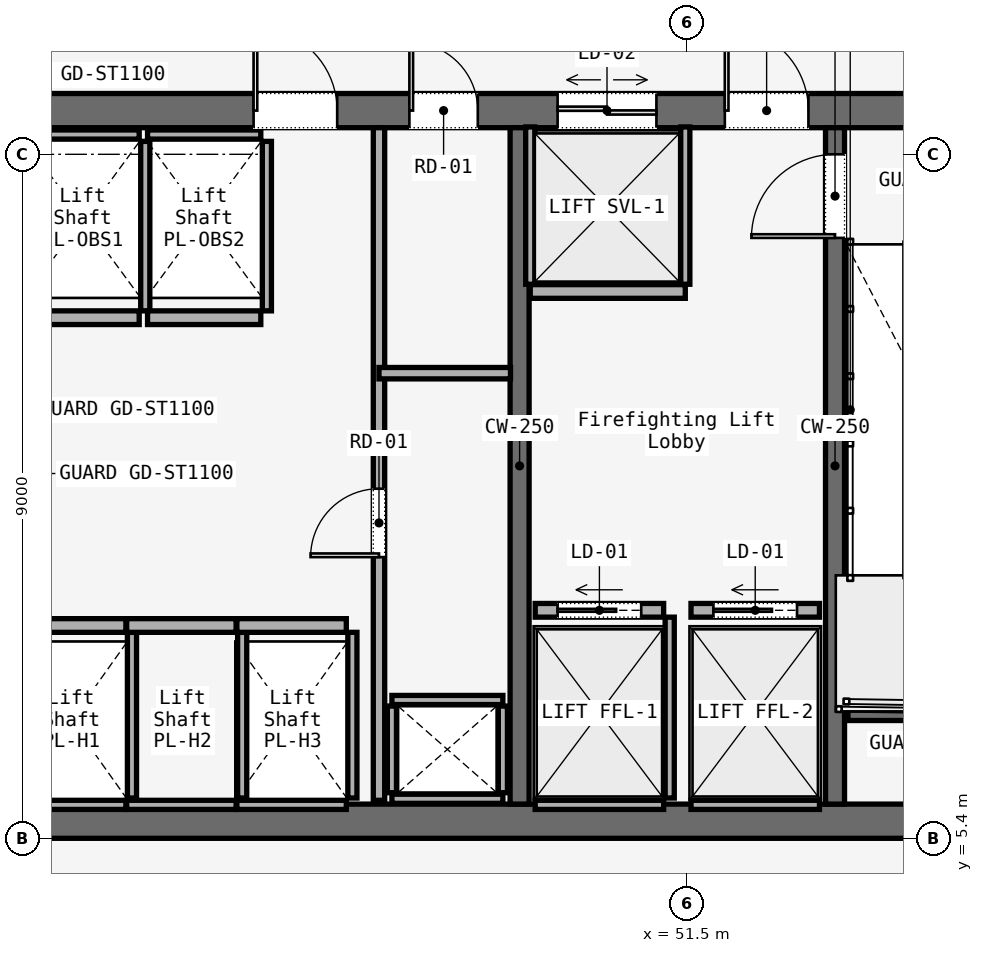
"""IFC4 building model, lengths in metres.
Left out: names, types, materials, properties, quantities, classifications, styles, units other than length and angle.
Written with IfcOpenShell. Run it as: python <this file> out.ifc"""

import sys

from ifc_helpers import new_model, si_unit, direction, frame, frame_2d, origin, place, context, subcontext, project, spatial, rectangle, extrude, element, fill, save


model = new_model("IFC4")
c1 = context("Model", 3, precision=1e-05, world=origin(), true_north=direction((0.0, 1.0)))
c2 = subcontext(c1, "Body", "Model", "MODEL_VIEW")
j1 = project(units=[si_unit("LENGTHUNIT", "METRE"), si_unit("PLANEANGLEUNIT", "RADIAN")], contexts=[c1])
p1 = place(None, origin())
s1 = spatial("IfcSite", under=j1, at=p1, CompositionType="ELEMENT")
p2 = place(p1, origin())
s2 = spatial("IfcBuilding", under=s1, at=p2, CompositionType="ELEMENT")
p3 = place(p2, frame((0.0, 0.0, 24.0)))
s3 = spatial("IfcBuildingStorey", under=s2, at=p3, CompositionType="ELEMENT", Elevation=24.0)
p4 = place(p3, frame((26.45, 14.975, 0.0), z_axis=(0.0, 0.0, 1.0), x_axis=(1.0, 0.0, 0.0)))
e1 = element("IfcWall", 1, at=p4, inside=s3, PredefinedType="SOLIDWALL", context=c2, shape_type="SweptSolid", body=[
    extrude(rectangle(XDim=31.1, YDim=0.45, at=frame_2d((15.55, 0.0))), origin(), (0.0, 0.0, 1.0), 5.55),
])
p5 = place(p4, frame((1.65, 0.0, 0.0)))
e2 = element("IfcOpeningElement", 2, at=p5, cuts=e1, PredefinedType="OPENING", context=c2, shape_type="SweptSolid", body=[
    extrude(rectangle(XDim=1.1, YDim=2.2, at=frame_2d((0.55, 1.1))), frame((0.0, 0.225, 0.0), z_axis=(0.0, -1.0, 0.0), x_axis=(1.0, 0.0, 0.0)), (0.0, 0.0, 1.0), 0.45),
])
p6 = place(p4, frame((13.65, 0.0, 0.0)))
e3 = element("IfcOpeningElement", 3, at=p6, cuts=e1, PredefinedType="OPENING", context=c2, shape_type="SweptSolid", body=[
    extrude(rectangle(XDim=1.1, YDim=2.2, at=frame_2d((0.55, 1.1))), frame((0.0, 0.225, 0.0), z_axis=(0.0, -1.0, 0.0), x_axis=(1.0, 0.0, 0.0)), (0.0, 0.0, 1.0), 0.45),
])
p7 = place(p4, frame((25.55, 0.0, 0.0)))
e4 = element("IfcOpeningElement", 4, at=p7, cuts=e1, PredefinedType="OPENING", context=c2, shape_type="SweptSolid", body=[
    extrude(rectangle(XDim=1.1, YDim=2.2, at=frame_2d((0.55, 1.1))), frame((0.0, 0.225, 0.0), z_axis=(0.0, -1.0, 0.0), x_axis=(1.0, 0.0, 0.0)), (0.0, 0.0, 1.0), 0.45),
])
p8 = place(p4, frame((10.7, 0.0, 0.0)))
e5 = element("IfcOpeningElement", 5, at=p8, cuts=e1, PredefinedType="OPENING", context=c2, shape_type="SweptSolid", body=[
    extrude(rectangle(XDim=1.4, YDim=2.2, at=frame_2d((0.7, 1.1))), frame((0.0, 0.225, 0.0), z_axis=(0.0, -1.0, 0.0), x_axis=(1.0, 0.0, 0.0)), (0.0, 0.0, 1.0), 0.45),
])
p9 = place(p4, frame((19.35, 0.0, 0.0)))
e6 = element("IfcOpeningElement", 6, at=p9, cuts=e1, PredefinedType="OPENING", context=c2, shape_type="SweptSolid", body=[
    extrude(rectangle(XDim=1.1, YDim=2.2, at=frame_2d((0.55, 1.1))), frame((0.0, 0.225, 0.0), z_axis=(0.0, -1.0, 0.0), x_axis=(1.0, 0.0, 0.0)), (0.0, 0.0, 1.0), 0.45),
])
p10 = place(p4, frame((21.4, 0.0, 0.0)))
e7 = element("IfcOpeningElement", 7, at=p10, cuts=e1, PredefinedType="OPENING", context=c2, shape_type="SweptSolid", body=[
    extrude(rectangle(XDim=0.9, YDim=2.1, at=frame_2d((0.45, 1.05))), frame((0.0, 0.225, 0.0), z_axis=(0.0, -1.0, 0.0), x_axis=(1.0, 0.0, 0.0)), (0.0, 0.0, 1.0), 0.45),
])
p11 = place(p4, frame((23.35, 0.0, 0.0)))
e8 = element("IfcOpeningElement", 8, at=p11, cuts=e1, PredefinedType="OPENING", context=c2, shape_type="SweptSolid", body=[
    extrude(rectangle(XDim=1.3, YDim=2.3, at=frame_2d((0.65, 1.15))), frame((0.0, 0.225, 0.0), z_axis=(0.0, -1.0, 0.0), x_axis=(1.0, 0.0, 0.0)), (0.0, 0.0, 1.0), 0.45),
])
p12 = place(p3, frame((26.45, 5.625, 0.0), z_axis=(0.0, 0.0, 1.0), x_axis=(1.0, 0.0, 0.0)))
e9 = element("IfcWall", 9, at=p12, inside=s3, PredefinedType="SOLIDWALL", context=c2, shape_type="SweptSolid", body=[
    extrude(rectangle(XDim=31.1, YDim=0.45, at=frame_2d((15.55, 0.0))), origin(), (0.0, 0.0, 1.0), 5.55),
])
p13 = place(p3, frame((49.3, 5.85, 0.0), z_axis=(0.0, 0.0, 1.0), x_axis=(0.0, 1.0, 0.0)))
e10 = element("IfcWall", 10, at=p13, inside=s3, PredefinedType="SOLIDWALL", context=c2, shape_type="SweptSolid", body=[
    extrude(rectangle(XDim=8.9, YDim=0.25, at=frame_2d((4.45, 0.0))), origin(), (0.0, 0.0, 1.0), 5.55),
])
p14 = place(p3, frame((53.45, 5.85, 0.0), z_axis=(0.0, 0.0, 1.0), x_axis=(0.0, 1.0, 0.0)))
e11 = element("IfcWall", 11, at=p14, inside=s3, PredefinedType="SOLIDWALL", context=c2, shape_type="SweptSolid", body=[
    extrude(rectangle(XDim=8.9, YDim=0.25, at=frame_2d((4.45, 0.0))), origin(), (0.0, 0.0, 1.0), 5.55),
])
p15 = place(p14, frame((7.45, 0.0, 0.0)))
e12 = element("IfcOpeningElement", 12, at=p15, cuts=e11, PredefinedType="OPENING", context=c2, shape_type="SweptSolid", body=[
    extrude(rectangle(XDim=1.1, YDim=2.2, at=frame_2d((0.55, 1.1))), frame((0.0, 0.125, 0.0), z_axis=(0.0, -1.0, 0.0), x_axis=(1.0, 0.0, 0.0)), (0.0, 0.0, 1.0), 0.25),
])
p16 = place(p3, frame((53.62, 7.05, 0.0), z_axis=(0.0, 0.0, 1.0), x_axis=(1.0, 0.0, 0.0)))
e13 = element("IfcWall", 13, at=p16, inside=s3, PredefinedType="SOLIDWALL", context=c2, shape_type="SweptSolid", body=[
    extrude(rectangle(XDim=3.115, YDim=0.2, at=frame_2d((1.558, 0.0))), origin(), (0.0, 0.0, 1.0), 6.0),
])
for number, where, z_axis, x_axis in (
    (14, (47.62, 5.92, 0.0), (0.0, 0.0, 1.0), (1.0, 0.0, 0.0)),
    (15, (47.62, 7.22, 0.0), (0.0, 0.0, 1.0), (1.0, 0.0, 0.0)),
):
    element("IfcWall", number, at=place(p3, frame(where, z_axis=z_axis, x_axis=x_axis)), inside=s3, PredefinedType="SOLIDWALL", context=c2, shape_type="SweptSolid", body=[
        extrude(rectangle(XDim=1.46, YDim=0.12, at=frame_2d((0.73, 0.0))), origin(), (0.0, 0.0, 1.0), 4.17),
    ])
for number, where, z_axis, x_axis in (
    (16, (47.62, 6.0, 0.0), (0.0, 0.0, 1.0), (0.0, 1.0, 0.0)),
    (17, (49.08, 6.0, 0.0), (0.0, 0.0, 1.0), (0.0, 1.0, 0.0)),
):
    element("IfcWall", number, at=place(p3, frame(where, z_axis=z_axis, x_axis=x_axis)), inside=s3, PredefinedType="SOLIDWALL", context=c2, shape_type="SweptSolid", body=[
        extrude(rectangle(XDim=1.14, YDim=0.12, at=frame_2d((0.57, 0.0))), origin(), (0.0, 0.0, 1.0), 4.17),
    ])
p17 = place(p3, frame((47.45, 5.9, 0.0), z_axis=(0.0, 0.0, 1.0), x_axis=(0.0, 1.0, 0.0)))
e18 = element("IfcWall", 18, at=p17, inside=s3, PredefinedType="PARTITIONING", context=c2, shape_type="SweptSolid", body=[
    extrude(rectangle(XDim=8.85, YDim=0.15, at=frame_2d((4.425, 0.0))), origin(), (0.0, 0.0, 1.0), 4.17),
])
p18 = place(p17, frame((3.2, 0.0, 0.0)))
e19 = element("IfcOpeningElement", 19, at=p18, cuts=e18, PredefinedType="OPENING", context=c2, shape_type="SweptSolid", body=[
    extrude(rectangle(XDim=0.9, YDim=2.1, at=frame_2d((0.45, 1.05))), frame((0.0, 0.075, 0.0), z_axis=(0.0, -1.0, 0.0), x_axis=(1.0, 0.0, 0.0)), (0.0, 0.0, 1.0), 0.15),
])
p19 = place(p3, frame((47.45, 11.52, 0.0), z_axis=(0.0, 0.0, 1.0), x_axis=(1.0, 0.0, 0.0)))
e20 = element("IfcWall", 20, at=p19, inside=s3, PredefinedType="PARTITIONING", context=c2, shape_type="SweptSolid", body=[
    extrude(rectangle(XDim=1.73, YDim=0.15, at=frame_2d((0.865, 0.0))), origin(), (0.0, 0.0, 1.0), 4.17),
])
p20 = place(p3, frame((42.78, 8.2, 0.0), z_axis=(0.0, 0.0, 1.0), x_axis=(1.0, 0.0, 0.0)))
e21 = element("IfcWall", 21, at=p20, inside=s3, PredefinedType="SOLIDWALL", context=c2, shape_type="SweptSolid", body=[
    extrude(rectangle(XDim=1.34, YDim=0.18, at=frame_2d((0.67, 0.0))), origin(), (0.0, 0.0, 1.0), 4.17),
])
p21 = place(p3, frame((42.78, 5.84, 0.0), z_axis=(0.0, 0.0, 1.0), x_axis=(1.0, 0.0, 0.0)))
e22 = element("IfcWall", 22, at=p21, inside=s3, PredefinedType="SOLIDWALL", context=c2, shape_type="SweptSolid", body=[
    extrude(rectangle(XDim=1.34, YDim=0.12, at=frame_2d((0.67, 0.0))), origin(), (0.0, 0.0, 1.0), 4.17),
])
p22 = place(p3, frame((44.2, 5.93, 0.0), z_axis=(0.0, 0.0, 1.0), x_axis=(0.0, 1.0, 0.0)))
e23 = element("IfcWall", 23, at=p22, inside=s3, PredefinedType="SOLIDWALL", context=c2, shape_type="SweptSolid", body=[
    extrude(rectangle(XDim=2.18, YDim=0.12, at=frame_2d((1.09, 0.0))), origin(), (0.0, 0.0, 1.0), 4.17),
])
p23 = place(p3, frame((44.13, 8.2, 0.0), z_axis=(0.0, 0.0, 1.0), x_axis=(1.0, 0.0, 0.0)))
e24 = element("IfcWall", 24, at=p23, inside=s3, PredefinedType="SOLIDWALL", context=c2, shape_type="SweptSolid", body=[
    extrude(rectangle(XDim=1.44, YDim=0.18, at=frame_2d((0.72, 0.0))), origin(), (0.0, 0.0, 1.0), 4.17),
])
p24 = place(p3, frame((44.13, 5.84, 0.0), z_axis=(0.0, 0.0, 1.0), x_axis=(1.0, 0.0, 0.0)))
e25 = element("IfcWall", 25, at=p24, inside=s3, PredefinedType="SOLIDWALL", context=c2, shape_type="SweptSolid", body=[
    extrude(rectangle(XDim=1.44, YDim=0.12, at=frame_2d((0.72, 0.0))), origin(), (0.0, 0.0, 1.0), 4.17),
])
p25 = place(p3, frame((45.65, 5.93, 0.0), z_axis=(0.0, 0.0, 1.0), x_axis=(0.0, 1.0, 0.0)))
e26 = element("IfcWall", 26, at=p25, inside=s3, PredefinedType="SOLIDWALL", context=c2, shape_type="SweptSolid", body=[
    extrude(rectangle(XDim=2.18, YDim=0.12, at=frame_2d((1.09, 0.0))), origin(), (0.0, 0.0, 1.0), 4.17),
])
p26 = place(p3, frame((45.58, 8.2, 0.0), z_axis=(0.0, 0.0, 1.0), x_axis=(1.0, 0.0, 0.0)))
e27 = element("IfcWall", 27, at=p26, inside=s3, PredefinedType="SOLIDWALL", context=c2, shape_type="SweptSolid", body=[
    extrude(rectangle(XDim=1.44, YDim=0.18, at=frame_2d((0.72, 0.0))), origin(), (0.0, 0.0, 1.0), 4.17),
])
p27 = place(p3, frame((45.58, 5.84, 0.0), z_axis=(0.0, 0.0, 1.0), x_axis=(1.0, 0.0, 0.0)))
e28 = element("IfcWall", 28, at=p27, inside=s3, PredefinedType="SOLIDWALL", context=c2, shape_type="SweptSolid", body=[
    extrude(rectangle(XDim=1.44, YDim=0.12, at=frame_2d((0.72, 0.0))), origin(), (0.0, 0.0, 1.0), 4.17),
])
p28 = place(p3, frame((47.1, 5.93, 0.0), z_axis=(0.0, 0.0, 1.0), x_axis=(0.0, 1.0, 0.0)))
e29 = element("IfcWall", 29, at=p28, inside=s3, PredefinedType="SOLIDWALL", context=c2, shape_type="SweptSolid", body=[
    extrude(rectangle(XDim=2.18, YDim=0.12, at=frame_2d((1.09, 0.0))), origin(), (0.0, 0.0, 1.0), 4.17),
])
p29 = place(p3, frame((42.805, 12.25, 0.0), z_axis=(0.0, 0.0, 1.0), x_axis=(1.0, 0.0, 0.0)))
e30 = element("IfcWall", 30, at=p29, inside=s3, PredefinedType="SOLIDWALL", context=c2, shape_type="SweptSolid", body=[
    extrude(rectangle(XDim=1.49, YDim=0.18, at=frame_2d((0.745, 0.0))), origin(), (0.0, 0.0, 1.0), 4.17),
])
p30 = place(p3, frame((42.805, 14.66, 0.0), z_axis=(0.0, 0.0, 1.0), x_axis=(1.0, 0.0, 0.0)))
e31 = element("IfcWall", 31, at=p30, inside=s3, PredefinedType="SOLIDWALL", context=c2, shape_type="SweptSolid", body=[
    extrude(rectangle(XDim=1.49, YDim=0.12, at=frame_2d((0.745, 0.0))), origin(), (0.0, 0.0, 1.0), 4.17),
])
p31 = place(p3, frame((44.375, 12.34, 0.0), z_axis=(0.0, 0.0, 1.0), x_axis=(0.0, 1.0, 0.0)))
e32 = element("IfcWall", 32, at=p31, inside=s3, PredefinedType="SOLIDWALL", context=c2, shape_type="SweptSolid", body=[
    extrude(rectangle(XDim=2.23, YDim=0.12, at=frame_2d((1.115, 0.0))), origin(), (0.0, 0.0, 1.0), 4.17),
])
p32 = place(p3, frame((44.405, 12.25, 0.0), z_axis=(0.0, 0.0, 1.0), x_axis=(1.0, 0.0, 0.0)))
e33 = element("IfcWall", 33, at=p32, inside=s3, PredefinedType="SOLIDWALL", context=c2, shape_type="SweptSolid", body=[
    extrude(rectangle(XDim=1.49, YDim=0.18, at=frame_2d((0.745, 0.0))), origin(), (0.0, 0.0, 1.0), 4.17),
])
p33 = place(p3, frame((44.405, 14.66, 0.0), z_axis=(0.0, 0.0, 1.0), x_axis=(1.0, 0.0, 0.0)))
e34 = element("IfcWall", 34, at=p33, inside=s3, PredefinedType="SOLIDWALL", context=c2, shape_type="SweptSolid", body=[
    extrude(rectangle(XDim=1.49, YDim=0.12, at=frame_2d((0.745, 0.0))), origin(), (0.0, 0.0, 1.0), 4.17),
])
p34 = place(p3, frame((45.975, 12.34, 0.0), z_axis=(0.0, 0.0, 1.0), x_axis=(0.0, 1.0, 0.0)))
e35 = element("IfcWall", 35, at=p34, inside=s3, PredefinedType="SOLIDWALL", context=c2, shape_type="SweptSolid", body=[
    extrude(rectangle(XDim=2.23, YDim=0.12, at=frame_2d((1.115, 0.0))), origin(), (0.0, 0.0, 1.0), 4.17),
])
p35 = place(p3, frame((49.505, 8.4, 0.0), z_axis=(0.0, 0.0, 1.0), x_axis=(1.0, 0.0, 0.0)))
e36 = element("IfcWall", 36, at=p35, inside=s3, PredefinedType="SOLIDWALL", context=c2, shape_type="SweptSolid", body=[
    extrude(rectangle(XDim=1.69, YDim=0.18, at=frame_2d((0.845, 0.0))), origin(), (0.0, 0.0, 1.0), 4.17),
])
p36 = place(p35, frame((0.295, 0.0, 0.0)))
e37 = element("IfcOpeningElement", 37, at=p36, cuts=e36, PredefinedType="OPENING", context=c2, shape_type="SweptSolid", body=[
    extrude(rectangle(XDim=1.1, YDim=2.2, at=frame_2d((0.55, 1.1))), frame((0.0, 0.09, 0.0), z_axis=(0.0, -1.0, 0.0), x_axis=(1.0, 0.0, 0.0)), (0.0, 0.0, 1.0), 0.18),
])
p37 = place(p3, frame((49.505, 5.84, 0.0), z_axis=(0.0, 0.0, 1.0), x_axis=(1.0, 0.0, 0.0)))
e38 = element("IfcWall", 38, at=p37, inside=s3, PredefinedType="SOLIDWALL", context=c2, shape_type="SweptSolid", body=[
    extrude(rectangle(XDim=1.69, YDim=0.12, at=frame_2d((0.845, 0.0))), origin(), (0.0, 0.0, 1.0), 4.17),
])
p38 = place(p3, frame((51.275, 5.93, 0.0), z_axis=(0.0, 0.0, 1.0), x_axis=(0.0, 1.0, 0.0)))
e39 = element("IfcWall", 39, at=p38, inside=s3, PredefinedType="SOLIDWALL", context=c2, shape_type="SweptSolid", body=[
    extrude(rectangle(XDim=2.38, YDim=0.12, at=frame_2d((1.19, 0.0))), origin(), (0.0, 0.0, 1.0), 4.17),
])
p39 = place(p3, frame((51.555, 8.4, 0.0), z_axis=(0.0, 0.0, 1.0), x_axis=(1.0, 0.0, 0.0)))
e40 = element("IfcWall", 40, at=p39, inside=s3, PredefinedType="SOLIDWALL", context=c2, shape_type="SweptSolid", body=[
    extrude(rectangle(XDim=1.69, YDim=0.18, at=frame_2d((0.845, 0.0))), origin(), (0.0, 0.0, 1.0), 4.17),
])
p40 = place(p39, frame((0.295, 0.0, 0.0)))
e41 = element("IfcOpeningElement", 41, at=p40, cuts=e40, PredefinedType="OPENING", context=c2, shape_type="SweptSolid", body=[
    extrude(rectangle(XDim=1.1, YDim=2.2, at=frame_2d((0.55, 1.1))), frame((0.0, 0.09, 0.0), z_axis=(0.0, -1.0, 0.0), x_axis=(1.0, 0.0, 0.0)), (0.0, 0.0, 1.0), 0.18),
])
p41 = place(p3, frame((51.555, 5.84, 0.0), z_axis=(0.0, 0.0, 1.0), x_axis=(1.0, 0.0, 0.0)))
e42 = element("IfcWall", 42, at=p41, inside=s3, PredefinedType="SOLIDWALL", context=c2, shape_type="SweptSolid", body=[
    extrude(rectangle(XDim=1.69, YDim=0.12, at=frame_2d((0.845, 0.0))), origin(), (0.0, 0.0, 1.0), 4.17),
])
p42 = place(p3, frame((49.44, 12.595, 0.0), z_axis=(0.0, 0.0, 1.0), x_axis=(1.0, 0.0, 0.0)))
e43 = element("IfcWall", 43, at=p42, inside=s3, PredefinedType="SOLIDWALL", context=c2, shape_type="SweptSolid", body=[
    extrude(rectangle(XDim=2.04, YDim=0.18, at=frame_2d((1.02, 0.0))), origin(), (0.0, 0.0, 1.0), 4.17),
])
for number, where, z_axis, x_axis in (
    (44, (49.44, 12.69, 0.0), (0.0, 0.0, 1.0), (0.0, 1.0, 0.0)),
    (45, (51.48, 12.69, 0.0), (0.0, 0.0, 1.0), (0.0, 1.0, 0.0)),
):
    element("IfcWall", number, at=place(p3, frame(where, z_axis=z_axis, x_axis=x_axis)), inside=s3, PredefinedType="SOLIDWALL", context=c2, shape_type="SweptSolid", body=[
        extrude(rectangle(XDim=2.07, YDim=0.12, at=frame_2d((1.035, 0.0))), origin(), (0.0, 0.0, 1.0), 4.17),
    ])
p43 = place(p7, origin())
e46 = element("IfcDoor", 46, at=p43, inside=s3, OperationType="SINGLE_SWING_RIGHT", PredefinedType="DOOR", context=c2, shape_type="SweptSolid", body=[
    extrude(rectangle(XDim=1.1, YDim=2.2, at=frame_2d((0.55, 1.1))), frame((0.0, 0.025, 0.0), z_axis=(0.0, -1.0, 0.0), x_axis=(1.0, 0.0, 0.0)), (0.0, 0.0, 1.0), 0.05),
])
fill(e4, e46)
p44 = place(p9, origin())
e47 = element("IfcDoor", 47, at=p44, inside=s3, OperationType="SINGLE_SWING_LEFT", PredefinedType="DOOR", context=c2, shape_type="SweptSolid", body=[
    extrude(rectangle(XDim=1.1, YDim=2.2, at=frame_2d((0.55, 1.1))), frame((0.0, 0.025, 0.0), z_axis=(0.0, -1.0, 0.0), x_axis=(1.0, 0.0, 0.0)), (0.0, 0.0, 1.0), 0.05),
])
fill(e6, e47)
p45 = place(p10, origin())
e48 = element("IfcDoor", 48, at=p45, inside=s3, OperationType="SINGLE_SWING_LEFT", PredefinedType="DOOR", context=c2, shape_type="SweptSolid", body=[
    extrude(rectangle(XDim=0.9, YDim=2.1, at=frame_2d((0.45, 1.05))), frame((0.0, 0.025, 0.0), z_axis=(0.0, -1.0, 0.0), x_axis=(1.0, 0.0, 0.0)), (0.0, 0.0, 1.0), 0.05),
])
fill(e7, e48)
p46 = place(p15, origin())
e49 = element("IfcDoor", 49, at=p46, inside=s3, OperationType="SINGLE_SWING_LEFT", PredefinedType="DOOR", context=c2, shape_type="SweptSolid", body=[
    extrude(rectangle(XDim=1.1, YDim=2.2, at=frame_2d((0.55, 1.1))), frame((0.0, 0.025, 0.0), z_axis=(0.0, -1.0, 0.0), x_axis=(1.0, 0.0, 0.0)), (0.0, 0.0, 1.0), 0.05),
])
fill(e12, e49)
p47 = place(p18, origin())
e50 = element("IfcDoor", 50, at=p47, inside=s3, OperationType="SINGLE_SWING_LEFT", PredefinedType="DOOR", context=c2, shape_type="SweptSolid", body=[
    extrude(rectangle(XDim=0.9, YDim=2.1, at=frame_2d((0.45, 1.05))), frame((0.0, 0.025, 0.0), z_axis=(0.0, -1.0, 0.0), x_axis=(1.0, 0.0, 0.0)), (0.0, 0.0, 1.0), 0.05),
])
fill(e19, e50)
p48 = place(p36, origin())
e51 = element("IfcDoor", 51, at=p48, inside=s3, OperationType="SLIDING_TO_LEFT", PredefinedType="DOOR", context=c2, shape_type="SweptSolid", body=[
    extrude(rectangle(XDim=1.1, YDim=2.2, at=frame_2d((0.55, 1.1))), frame((0.0, 0.025, 0.0), z_axis=(0.0, -1.0, 0.0), x_axis=(1.0, 0.0, 0.0)), (0.0, 0.0, 1.0), 0.05),
])
fill(e37, e51)
p49 = place(p40, origin())
e52 = element("IfcDoor", 52, at=p49, inside=s3, OperationType="SLIDING_TO_LEFT", PredefinedType="DOOR", context=c2, shape_type="SweptSolid", body=[
    extrude(rectangle(XDim=1.1, YDim=2.2, at=frame_2d((0.55, 1.1))), frame((0.0, 0.025, 0.0), z_axis=(0.0, -1.0, 0.0), x_axis=(1.0, 0.0, 0.0)), (0.0, 0.0, 1.0), 0.05),
])
fill(e41, e52)
p50 = place(p11, origin())
e53 = element("IfcDoor", 53, at=p50, inside=s3, OperationType="DOUBLE_DOOR_SLIDING", PredefinedType="DOOR", context=c2, shape_type="SweptSolid", body=[
    extrude(rectangle(XDim=1.3, YDim=2.3, at=frame_2d((0.65, 1.15))), frame((0.0, 0.025, 0.0), z_axis=(0.0, -1.0, 0.0), x_axis=(1.0, 0.0, 0.0)), (0.0, 0.0, 1.0), 0.05),
])
fill(e8, e53)
save(model, sys.argv[1])
